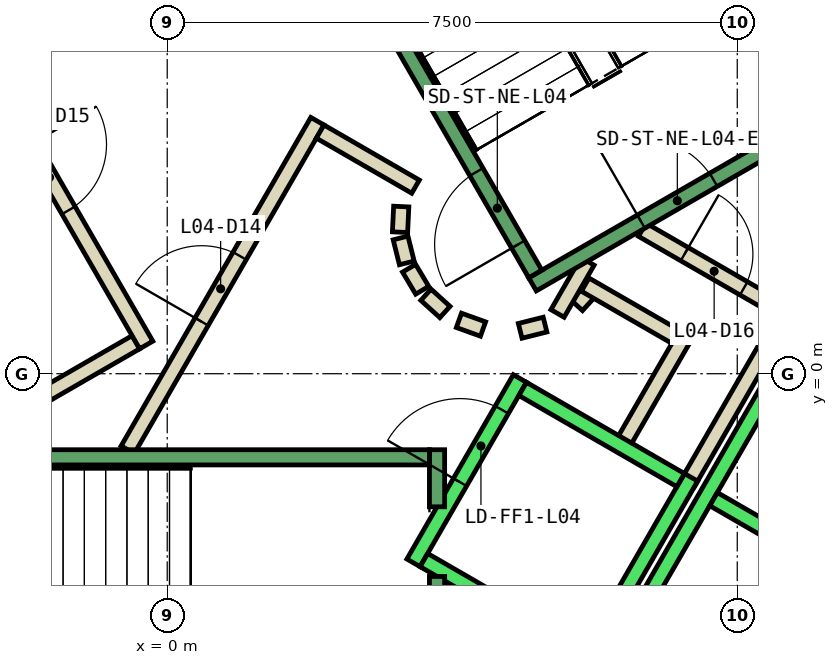
"""IFC4 building model, lengths in metres.
Left out: names, types, materials, properties, quantities, classifications, styles, units other than length and angle.
Written with IfcOpenShell. Run it as: python <this file> out.ifc"""

import sys

from ifc_helpers import new_model, si_unit, direction, frame, frame_2d, origin, place, context, subcontext, project, spatial, polyline, rectangle, outline, extrude, element, fill, save


model = new_model("IFC4")
c1 = context("Model", 3, precision=1e-05, world=origin(), true_north=direction((0.0, 1.0)))
c2 = subcontext(c1, "Body", "Model", "MODEL_VIEW")
j1 = project(units=[si_unit("LENGTHUNIT", "METRE"), si_unit("PLANEANGLEUNIT", "RADIAN")], contexts=[c1])
p1 = place(None, origin())
s1 = spatial("IfcSite", under=j1, at=p1, CompositionType="ELEMENT")
p2 = place(p1, origin())
s2 = spatial("IfcBuilding", under=s1, at=p2, CompositionType="ELEMENT")
p3 = place(p2, frame((0.0, 0.0, 25.0)))
s3 = spatial("IfcBuildingStorey", under=s2, at=p3, CompositionType="ELEMENT", Elevation=25.0)
p4 = place(p3, frame((0.0, 0.0, -0.45)))
e1 = element("IfcWall", 1, at=p4, inside=s3, PredefinedType="SHEAR", context=c2, shape_type="SweptSolid", body=[
    extrude(outline(polyline([(8.517, 11.748), (7.651, 11.248), (12.702, 2.5), (13.856, 2.5), (8.517, 11.748)])), origin(), (0.0, 0.0, 1.0), 5.0),
])
p5 = place(p3, frame((5.39, 0.898, 0.0), z_axis=(0.0, 0.0, 1.0), x_axis=(0.673828488714, 0.738887791073, 0.0)))
e2 = element("IfcWall", 2, at=p5, inside=s3, PredefinedType="PARTITIONING", context=c2, shape_type="SweptSolid", body=[
    extrude(rectangle(XDim=0.263, YDim=0.2, at=frame_2d((0.131, 0.0))), origin(), (0.0, 0.0, 1.0), 4.55),
])
p6 = place(p3, frame((5.499, 1.172, 0.0), z_axis=(0.0, 0.0, 1.0), x_axis=(0.866333505267, -0.499465972466, 0.0)))
e3 = element("IfcWall", 3, at=p6, inside=s3, PredefinedType="PARTITIONING", context=c2, shape_type="SweptSolid", body=[
    extrude(rectangle(XDim=1.374, YDim=0.2, at=frame_2d((0.687, 0.0))), origin(), (0.0, 0.0, 1.0), 4.55),
])
p7 = place(p3, frame((6.826, 0.522, 0.0), z_axis=(0.0, 0.0, 1.0), x_axis=(-0.500016722714, -0.866015748706, 0.0)))
e4 = element("IfcWall", 4, at=p7, inside=s3, PredefinedType="PARTITIONING", context=c2, shape_type="SweptSolid", body=[
    extrude(rectangle(XDim=1.7, YDim=0.2, at=frame_2d((0.85, 0.0))), origin(), (0.0, 0.0, 1.0), 4.55),
])
p8 = place(p3, frame((8.192, 0.888, 0.0), z_axis=(0.0, 0.0, 1.0), x_axis=(-0.499940625693, -0.866059680843, 0.0)))
e5 = element("IfcWall", 5, at=p8, inside=s3, PredefinedType="PARTITIONING", context=c2, shape_type="SweptSolid", body=[
    extrude(rectangle(XDim=2.68, YDim=0.2, at=frame_2d((1.34, 0.0))), origin(), (0.0, 0.0, 1.0), 4.55),
])
p9 = place(p3, frame((5.135, 0.793, 0.0), z_axis=(0.0, 0.0, 1.0), x_axis=(0.499526442893, 0.866298639529, 0.0)))
e6 = element("IfcWall", 6, at=p9, inside=s3, PredefinedType="PARTITIONING", context=c2, shape_type="SweptSolid", body=[
    extrude(rectangle(XDim=0.791, YDim=0.2, at=frame_2d((0.396, 0.0))), origin(), (0.0, 0.0, 1.0), 4.55),
])
p10 = place(p3, frame((6.25, 1.894, 0.0), z_axis=(0.0, 0.0, 1.0), x_axis=(0.866043184279, -0.499969202016, 0.0)))
e7 = element("IfcWall", 7, at=p10, inside=s3, PredefinedType="PARTITIONING", context=c2, shape_type="SweptSolid", body=[
    extrude(rectangle(XDim=2.084, YDim=0.2, at=frame_2d((1.042, 0.0))), origin(), (0.0, 0.0, 1.0), 4.55),
])
p11 = place(p10, frame((0.642, 0.0, 0.0)))
e8 = element("IfcOpeningElement", 8, at=p11, cuts=e7, PredefinedType="OPENING", context=c2, shape_type="SweptSolid", body=[
    extrude(rectangle(XDim=0.9, YDim=2.1, at=frame_2d((0.45, 1.05))), frame((0.0, 0.11, 0.0), z_axis=(0.0, -1.0, 0.0), x_axis=(1.0, 0.0, 0.0)), (0.0, 0.0, 1.0), 0.22),
])
p12 = place(p3, frame((3.079, 2.199, 0.0), z_axis=(0.0, 0.0, 1.0), x_axis=(-0.047771483479, -0.998858290933, 0.0)))
e9 = element("IfcWall", 9, at=p12, inside=s3, PredefinedType="PARTITIONING", context=c2, shape_type="SweptSolid", body=[
    extrude(rectangle(XDim=0.337, YDim=0.2, at=frame_2d((0.169, 0.0))), origin(), (0.0, 0.0, 1.0), 4.55),
])
p13 = place(p3, frame((3.07, 1.786, 0.0), z_axis=(0.0, 0.0, 1.0), x_axis=(0.242705583207, -0.970099994784, 0.0)))
e10 = element("IfcWall", 10, at=p13, inside=s3, PredefinedType="PARTITIONING", context=c2, shape_type="SweptSolid", body=[
    extrude(rectangle(XDim=0.338, YDim=0.2, at=frame_2d((0.169, 0.0))), origin(), (0.0, 0.0, 1.0), 4.55),
])
for number, where, z_axis, x_axis in (
    (11, (3.182, 1.388, 0.0), (0.0, 0.0, 1.0), (0.512, -0.859, 0.0)),
    (12, (3.404, 1.039, 0.0), (0.0, 0.0, 1.0), (0.74, -0.672, 0.0)),
):
    element("IfcWall", number, at=place(p3, frame(where, z_axis=z_axis, x_axis=x_axis)), inside=s3, PredefinedType="PARTITIONING", context=c2, shape_type="SweptSolid", body=[
        extrude(rectangle(XDim=0.338, YDim=0.2, at=frame_2d((0.169, 0.0))), origin(), (0.0, 0.0, 1.0), 4.55),
    ])
p14 = place(p3, frame((3.838, 0.702, 0.0), z_axis=(0.0, 0.0, 1.0), x_axis=(0.941035081519, -0.338308993895, 0.0)))
e13 = element("IfcWall", 13, at=p14, inside=s3, PredefinedType="PARTITIONING", context=c2, shape_type="SweptSolid", body=[
    extrude(rectangle(XDim=0.337, YDim=0.2, at=frame_2d((0.168, 0.0))), origin(), (0.0, 0.0, 1.0), 4.55),
])
p15 = place(p3, frame((4.644, 0.564, 0.0), z_axis=(0.0, 0.0, 1.0), x_axis=(0.969929076366, 0.243387729394, 0.0)))
e14 = element("IfcWall", 14, at=p15, inside=s3, PredefinedType="PARTITIONING", context=c2, shape_type="SweptSolid", body=[
    extrude(rectangle(XDim=0.337, YDim=0.2, at=frame_2d((0.168, 0.0))), origin(), (0.0, 0.0, 1.0), 4.55),
])
p16 = place(p3, frame((-0.52, -1.0, 0.0), z_axis=(0.0, 0.0, 1.0), x_axis=(0.50011622646, 0.865958290007, 0.0)))
e15 = element("IfcWall", 15, at=p16, inside=s3, PredefinedType="PARTITIONING", context=c2, shape_type="SweptSolid", body=[
    extrude(rectangle(XDim=4.991, YDim=0.2, at=frame_2d((2.496, 0.0))), origin(), (0.0, 0.0, 1.0), 4.55),
])
p17 = place(p16, frame((1.945, 0.0, 0.0)))
e16 = element("IfcOpeningElement", 16, at=p17, cuts=e15, PredefinedType="OPENING", context=c2, shape_type="SweptSolid", body=[
    extrude(rectangle(XDim=1.0, YDim=2.1, at=frame_2d((0.5, 1.05))), frame((0.0, 0.11, 0.0), z_axis=(0.0, -1.0, 0.0), x_axis=(1.0, 0.0, 0.0)), (0.0, 0.0, 1.0), 0.22),
])
p18 = place(p3, frame((2.012, 3.186, 0.0), z_axis=(0.0, 0.0, 1.0), x_axis=(0.865891012941, -0.500232699559, 0.0)))
e17 = element("IfcWall", 17, at=p18, inside=s3, PredefinedType="PARTITIONING", context=c2, shape_type="SweptSolid", body=[
    extrude(rectangle(XDim=1.449, YDim=0.2, at=frame_2d((0.725, 0.0))), origin(), (0.0, 0.0, 1.0), 4.55),
])
p19 = place(p3, frame((-0.412, 0.414, 0.0), z_axis=(0.0, 0.0, 1.0), x_axis=(-0.866017369001, -0.500013916395, 0.0)))
e18 = element("IfcWall", 18, at=p19, inside=s3, PredefinedType="PARTITIONING", context=c2, shape_type="SweptSolid", body=[
    extrude(rectangle(XDim=1.45, YDim=0.2, at=frame_2d((0.725, 0.0))), origin(), (0.0, 0.0, 1.0), 4.55),
])
p20 = place(p3, frame((-2.771, 4.7, 0.0), z_axis=(0.0, 0.0, 1.0), x_axis=(0.499969479948, -0.866043023828, 0.0)))
e19 = element("IfcWall", 19, at=p20, inside=s3, PredefinedType="PARTITIONING", context=c2, shape_type="SweptSolid", body=[
    extrude(rectangle(XDim=4.99, YDim=0.2, at=frame_2d((2.495, 0.0))), origin(), (0.0, 0.0, 1.0), 4.55),
])
p21 = place(p20, frame((1.945, 0.0, 0.0)))
e20 = element("IfcOpeningElement", 20, at=p21, cuts=e19, PredefinedType="OPENING", context=c2, shape_type="SweptSolid", body=[
    extrude(rectangle(XDim=1.0, YDim=2.1, at=frame_2d((0.5, 1.05))), frame((0.0, 0.11, 0.0), z_axis=(0.0, -1.0, 0.0), x_axis=(1.0, 0.0, 0.0)), (0.0, 0.0, 1.0), 0.22),
])
p22 = place(p3, frame((3.24, -2.488, 0.0), z_axis=(0.0, 0.0, 1.0), x_axis=(0.49994636267, 0.866056369097, 0.0)))
e21 = element("IfcWall", 21, at=p22, inside=s3, PredefinedType="STANDARD", context=c2, shape_type="SweptSolid", body=[
    extrude(rectangle(XDim=2.8, YDim=0.2, at=frame_2d((1.4, 0.0))), origin(), (0.0, 0.0, 1.0), 4.55),
])
p23 = place(p22, frame((1.225, 0.0, 0.0)))
e22 = element("IfcOpeningElement", 22, at=p23, cuts=e21, PredefinedType="OPENING", context=c2, shape_type="SweptSolid", body=[
    extrude(rectangle(XDim=1.1, YDim=2.1, at=frame_2d((0.55, 1.05))), frame((0.0, 0.11, 0.0), z_axis=(0.0, -1.0, 0.0), x_axis=(1.0, 0.0, 0.0)), (0.0, 0.0, 1.0), 0.22),
])
p24 = place(p3, frame((5.492, -3.788, 0.0), z_axis=(0.0, 0.0, 1.0), x_axis=(0.500011755427, 0.866018616679, 0.0)))
e23 = element("IfcWall", 23, at=p24, inside=s3, PredefinedType="STANDARD", context=c2, shape_type="SweptSolid", body=[
    extrude(rectangle(XDim=2.8, YDim=0.2, at=frame_2d((1.4, 0.0))), origin(), (0.0, 0.0, 1.0), 4.55),
])
p25 = place(p3, frame((3.377, -2.452, 0.0), z_axis=(0.0, 0.0, 1.0), x_axis=(0.865955154139, -0.50012165622, 0.0)))
e24 = element("IfcWall", 24, at=p25, inside=s3, PredefinedType="STANDARD", context=c2, shape_type="SweptSolid", body=[
    extrude(rectangle(XDim=2.4, YDim=0.2, at=frame_2d((1.2, 0.0))), origin(), (0.0, 0.0, 1.0), 4.55),
])
p26 = place(p3, frame((4.677, -0.2, 0.0), z_axis=(0.0, 0.0, 1.0), x_axis=(0.865973769406, -0.500089422704, 0.0)))
e25 = element("IfcWall", 25, at=p26, inside=s3, PredefinedType="STANDARD", context=c2, shape_type="SweptSolid", body=[
    extrude(rectangle(XDim=2.399, YDim=0.2, at=frame_2d((1.2, 0.0))), origin(), (0.0, 0.0, 1.0), 4.55),
])
p27 = place(p3, frame((4.451, -6.19, 0.0), z_axis=(0.0, 0.0, 1.0), x_axis=(0.50000090737, 0.866024879913, 0.0)))
e26 = element("IfcWall", 26, at=p27, inside=s3, PredefinedType="STANDARD", context=c2, shape_type="SweptSolid", body=[
    extrude(rectangle(XDim=10.6, YDim=0.2, at=frame_2d((5.3, 0.0))), origin(), (0.0, 0.0, 1.0), 4.55),
])
p28 = place(p3, frame((7.188, -1.65, 0.0), z_axis=(0.0, 0.0, 1.0), x_axis=(0.866022959057, -0.500004234368, 0.0)))
e27 = element("IfcWall", 27, at=p28, inside=s3, PredefinedType="STANDARD", context=c2, shape_type="SweptSolid", body=[
    extrude(rectangle(XDim=2.5, YDim=0.2, at=frame_2d((1.25, 0.0))), origin(), (0.0, 0.0, 1.0), 4.55),
])
p29 = place(p3, frame((3.55, -2.667, 0.0), z_axis=(0.0, 0.0, 1.0), x_axis=(0.0, -1.0, 0.0)))
e28 = element("IfcWall", 28, at=p29, inside=s3, PredefinedType="STANDARD", context=c2, shape_type="SweptSolid", body=[
    extrude(rectangle(XDim=2.733, YDim=0.2, at=frame_2d((1.366, 0.0))), origin(), (0.0, 0.0, 1.0), 4.55),
])
p30 = place(p3, frame((3.55, -1.0, 0.0), z_axis=(0.0, 0.0, 1.0), x_axis=(0.0, -1.0, 0.0)))
e29 = element("IfcWall", 29, at=p30, inside=s3, PredefinedType="STANDARD", context=c2, shape_type="SweptSolid", body=[
    extrude(rectangle(XDim=0.751, YDim=0.2, at=frame_2d((0.375, 0.0))), origin(), (0.0, 0.0, 1.0), 4.55),
])
p31 = place(p3, frame((-3.45, -1.1, 0.0), z_axis=(0.0, 0.0, 1.0), x_axis=(1.0, 0.0, 0.0)))
e30 = element("IfcWall", 30, at=p31, inside=s3, PredefinedType="STANDARD", context=c2, shape_type="SweptSolid", body=[
    extrude(rectangle(XDim=6.9, YDim=0.2, at=frame_2d((3.45, 0.0))), origin(), (0.0, 0.0, 1.0), 4.55),
])
p32 = place(p31, frame((0.45, 0.0, 0.0)))
e31 = element("IfcOpeningElement", 31, at=p32, cuts=e30, PredefinedType="OPENING", context=c2, shape_type="SweptSolid", body=[
    extrude(rectangle(XDim=1.1, YDim=2.2, at=frame_2d((0.55, 1.1))), frame((0.0, 0.11, 0.0), z_axis=(0.0, -1.0, 0.0), x_axis=(1.0, 0.0, 0.0)), (0.0, 0.0, 1.0), 0.22),
])
p33 = place(p3, frame((4.806, 1.176, 0.0), z_axis=(0.0, 0.0, 1.0), x_axis=(0.866059941101, 0.499940174841, 0.0)))
e32 = element("IfcWall", 32, at=p33, inside=s3, PredefinedType="STANDARD", context=c2, shape_type="SweptSolid", body=[
    extrude(rectangle(XDim=4.4, YDim=0.2, at=frame_2d((2.2, 0.0))), origin(), (0.0, 0.0, 1.0), 4.55),
])
p34 = place(p33, frame((1.65, 0.0, 0.0)))
e33 = element("IfcOpeningElement", 33, at=p34, cuts=e32, PredefinedType="OPENING", context=c2, shape_type="SweptSolid", body=[
    extrude(rectangle(XDim=1.1, YDim=2.2, at=frame_2d((0.55, 1.1))), frame((0.0, 0.11, 0.0), z_axis=(0.0, -1.0, 0.0), x_axis=(1.0, 0.0, 0.0)), (0.0, 0.0, 1.0), 0.22),
])
p35 = place(p3, frame((4.843, 1.312, 0.0), z_axis=(0.0, 0.0, 1.0), x_axis=(-0.499963383562, 0.866046543262, 0.0)))
e34 = element("IfcWall", 34, at=p35, inside=s3, PredefinedType="STANDARD", context=c2, shape_type="SweptSolid", body=[
    extrude(rectangle(XDim=6.9, YDim=0.2, at=frame_2d((3.45, 0.0))), origin(), (0.0, 0.0, 1.0), 4.55),
])
p36 = place(p35, frame((0.45, 0.0, 0.0)))
e35 = element("IfcOpeningElement", 35, at=p36, cuts=e34, PredefinedType="OPENING", context=c2, shape_type="SweptSolid", body=[
    extrude(rectangle(XDim=1.1, YDim=2.2, at=frame_2d((0.55, 1.1))), frame((0.0, 0.11, 0.0), z_axis=(0.0, -1.0, 0.0), x_axis=(1.0, 0.0, 0.0)), (0.0, 0.0, 1.0), 0.22),
])
p37 = place(p3, frame((8.48, 3.412, 0.0), z_axis=(0.0, 0.0, 1.0), x_axis=(-0.499978703459, 0.866037698999, 0.0)))
e36 = element("IfcWall", 36, at=p37, inside=s3, PredefinedType="STANDARD", context=c2, shape_type="SweptSolid", body=[
    extrude(rectangle(XDim=6.9, YDim=0.2, at=frame_2d((3.45, 0.0))), origin(), (0.0, 0.0, 1.0), 4.55),
])
p38 = place(p3, frame((-1.393, 7.288, 0.0), z_axis=(0.0, 0.0, 1.0), x_axis=(-0.499963383562, -0.866046543262, 0.0)))
e37 = element("IfcWall", 37, at=p38, inside=s3, PredefinedType="STANDARD", context=c2, shape_type="SweptSolid", body=[
    extrude(rectangle(XDim=6.9, YDim=0.2, at=frame_2d((3.45, 0.0))), origin(), (0.0, 0.0, 1.0), 4.55),
])
p39 = place(p38, frame((0.45, 0.0, 0.0)))
e38 = element("IfcOpeningElement", 38, at=p39, cuts=e37, PredefinedType="OPENING", context=c2, shape_type="SweptSolid", body=[
    extrude(rectangle(XDim=1.1, YDim=2.2, at=frame_2d((0.55, 1.1))), frame((0.0, 0.11, 0.0), z_axis=(0.0, -1.0, 0.0), x_axis=(1.0, 0.0, 0.0)), (0.0, 0.0, 1.0), 0.22),
])
p40 = place(p17, origin())
e39 = element("IfcDoor", 39, at=p40, inside=s3, OperationType="SINGLE_SWING_LEFT", PredefinedType="DOOR", context=c2, shape_type="SweptSolid", body=[
    extrude(rectangle(XDim=1.0, YDim=2.1, at=frame_2d((0.5, 1.05))), frame((0.0, 0.025, 0.0), z_axis=(0.0, -1.0, 0.0), x_axis=(1.0, 0.0, 0.0)), (0.0, 0.0, 1.0), 0.05),
])
fill(e16, e39)
p41 = place(p21, origin())
e40 = element("IfcDoor", 40, at=p41, inside=s3, OperationType="SINGLE_SWING_RIGHT", PredefinedType="DOOR", context=c2, shape_type="SweptSolid", body=[
    extrude(rectangle(XDim=1.0, YDim=2.1, at=frame_2d((0.5, 1.05))), frame((0.0, 0.025, 0.0), z_axis=(0.0, -1.0, 0.0), x_axis=(1.0, 0.0, 0.0)), (0.0, 0.0, 1.0), 0.05),
])
fill(e20, e40)
p42 = place(p11, origin())
e41 = element("IfcDoor", 41, at=p42, inside=s3, OperationType="SINGLE_SWING_LEFT", PredefinedType="DOOR", context=c2, shape_type="SweptSolid", body=[
    extrude(rectangle(XDim=0.9, YDim=2.1, at=frame_2d((0.45, 1.05))), frame((0.0, 0.025, 0.0), z_axis=(0.0, -1.0, 0.0), x_axis=(1.0, 0.0, 0.0)), (0.0, 0.0, 1.0), 0.05),
])
fill(e8, e41)
p43 = place(p23, origin())
e42 = element("IfcDoor", 42, at=p43, inside=s3, OperationType="SLIDING_TO_LEFT", PredefinedType="DOOR", context=c2, shape_type="SweptSolid", body=[
    extrude(rectangle(XDim=1.1, YDim=2.1, at=frame_2d((0.55, 1.05))), frame((0.0, 0.025, 0.0), z_axis=(0.0, -1.0, 0.0), x_axis=(1.0, 0.0, 0.0)), (0.0, 0.0, 1.0), 0.05),
])
fill(e22, e42)
p44 = place(p36, origin())
e43 = element("IfcDoor", 43, at=p44, inside=s3, OperationType="SINGLE_SWING_LEFT", PredefinedType="DOOR", context=c2, shape_type="SweptSolid", body=[
    extrude(rectangle(XDim=1.1, YDim=2.2, at=frame_2d((0.55, 1.1))), frame((0.0, 0.025, 0.0), z_axis=(0.0, -1.0, 0.0), x_axis=(1.0, 0.0, 0.0)), (0.0, 0.0, 1.0), 0.05),
])
fill(e35, e43)
p45 = place(p34, origin())
e44 = element("IfcDoor", 44, at=p45, inside=s3, OperationType="SINGLE_SWING_LEFT", PredefinedType="DOOR", context=c2, shape_type="SweptSolid", body=[
    extrude(rectangle(XDim=1.1, YDim=2.2, at=frame_2d((0.55, 1.1))), frame((0.0, 0.025, 0.0), z_axis=(0.0, -1.0, 0.0), x_axis=(1.0, 0.0, 0.0)), (0.0, 0.0, 1.0), 0.05),
])
fill(e33, e44)
save(model, sys.argv[1])
